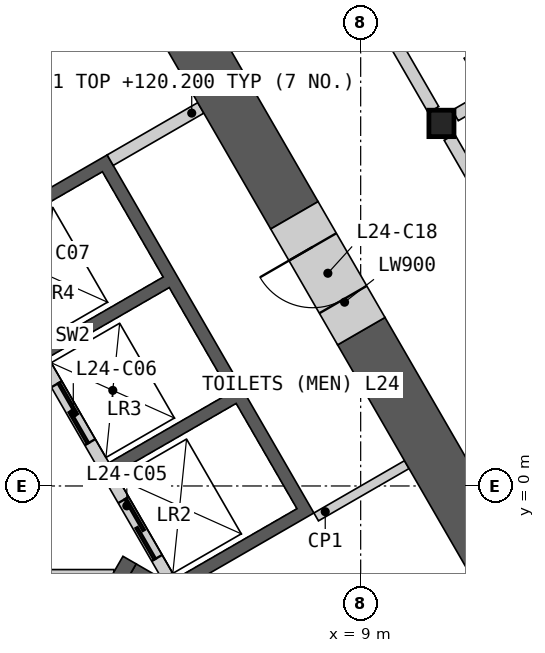
"""IFC4 building model, lengths in metres.
Left out: names, types, materials, properties, quantities, classifications, styles, units other than length and angle.
Written with IfcOpenShell. Run it as: python <this file> out.ifc"""

import sys

from ifc_helpers import new_model, si_unit, direction, frame, frame_2d, origin, origin_2d, place, context, subcontext, project, spatial, polyline, rectangle, i_section, outline, extrude, element, fill, save


model = new_model("IFC4")
c1 = context("Model", 3, precision=1e-05, world=origin(), true_north=direction((0.0, 1.0)))
c2 = subcontext(c1, "Body", "Model", "MODEL_VIEW")
j1 = project(units=[si_unit("LENGTHUNIT", "METRE"), si_unit("PLANEANGLEUNIT", "RADIAN")], contexts=[c1])
p1 = place(None, origin())
s1 = spatial("IfcSite", under=j1, at=p1, CompositionType="ELEMENT")
p2 = place(p1, origin())
s2 = spatial("IfcBuilding", under=s1, at=p2, CompositionType="ELEMENT")
p3 = place(p2, frame((0.0, 0.0, 116.4)))
s3 = spatial("IfcBuildingStorey", under=s2, at=p3, CompositionType="ELEMENT", Elevation=116.4)
p4 = place(p3, frame((10.328, 5.963, 0.0), z_axis=(0.0, 0.0, 1.0), x_axis=(1.0, 0.0, 0.0)))
e1 = element("IfcColumn", 1, at=p4, inside=s3, PredefinedType="COLUMN", context=c2, shape_type="SweptSolid", body=[
    extrude(i_section(OverallWidth=0.412, OverallDepth=0.435, WebThickness=0.036, FlangeThickness=0.057, at=origin_2d()), origin(), (0.0, 0.0, 1.0), 4.2),
])
p5 = place(p3, origin())
e2 = element("IfcWall", 2, at=p5, inside=s3, PredefinedType="SHEAR", context=c2, shape_type="SweptSolid", body=[
    extrude(outline(polyline([(2.66, 4.192), (4.831, 5.445), (8.231, -0.444), (6.061, -1.697), (5.96, -1.524), (7.952, -0.374), (6.952, 1.358), (4.96, 0.208), (4.861, 0.381), (6.852, 1.531), (5.852, 3.263), (3.861, 2.113), (3.76, 2.287), (5.752, 3.437), (4.752, 5.169), (2.76, 4.019), (2.66, 4.192)])), origin(), (0.0, 0.0, 1.0), 3.8),
])
p6 = place(p3, frame((5.817, -1.476, 0.0), z_axis=(0.0, 0.0, 1.0), x_axis=(-0.500002616675, 0.866023893041, 0.0)))
e3 = element("IfcWall", 3, at=p6, inside=s3, PredefinedType="SOLIDWALL", context=c2, shape_type="SweptSolid", body=[
    extrude(rectangle(XDim=8.373, YDim=0.2, at=frame_2d((4.187, 0.0))), origin(), (0.0, 0.0, 1.0), 3.8),
])
p7 = place(p6, frame((0.337, 0.0, 0.0)))
e4 = element("IfcOpeningElement", 4, at=p7, cuts=e3, PredefinedType="OPENING", context=c2, shape_type="SweptSolid", body=[
    extrude(rectangle(XDim=1.1, YDim=2.1, at=frame_2d((0.55, 1.05))), frame((0.0, 0.11, 0.0), z_axis=(0.0, -1.0, 0.0), x_axis=(1.0, 0.0, 0.0)), (0.0, 0.0, 1.0), 0.22),
])
p8 = place(p6, frame((2.537, 0.0, 0.0)))
e5 = element("IfcOpeningElement", 5, at=p8, cuts=e3, PredefinedType="OPENING", context=c2, shape_type="SweptSolid", body=[
    extrude(rectangle(XDim=1.1, YDim=2.1, at=frame_2d((0.55, 1.05))), frame((0.0, 0.11, 0.0), z_axis=(0.0, -1.0, 0.0), x_axis=(1.0, 0.0, 0.0)), (0.0, 0.0, 1.0), 0.22),
])
p9 = place(p6, frame((4.737, 0.0, 0.0)))
e6 = element("IfcOpeningElement", 6, at=p9, cuts=e3, PredefinedType="OPENING", context=c2, shape_type="SweptSolid", body=[
    extrude(rectangle(XDim=1.1, YDim=2.1, at=frame_2d((0.55, 1.05))), frame((0.0, 0.11, 0.0), z_axis=(0.0, -1.0, 0.0), x_axis=(1.0, 0.0, 0.0)), (0.0, 0.0, 1.0), 0.22),
])
p10 = place(p6, frame((7.037, 0.0, 0.0)))
e7 = element("IfcOpeningElement", 7, at=p10, cuts=e3, PredefinedType="OPENING", context=c2, shape_type="SweptSolid", body=[
    extrude(rectangle(XDim=0.9, YDim=2.1, at=frame_2d((0.45, 1.05))), frame((0.0, 0.11, 0.0), z_axis=(0.0, -1.0, 0.0), x_axis=(1.0, 0.0, 0.0)), (0.0, 0.0, 1.0), 0.22),
])
p11 = place(p3, frame((4.881, 5.358, 0.0), z_axis=(0.0, 0.0, 1.0), x_axis=(0.866024871741, 0.500000921525, 0.0)))
e8 = element("IfcWall", 8, at=p11, inside=s3, PredefinedType="SHEAR", context=c2, shape_type="SweptSolid", body=[
    extrude(rectangle(XDim=1.72, YDim=0.2, at=frame_2d((0.86, 0.0))), origin(), (0.0, 0.0, 1.0), 3.8),
])
p12 = place(p3, frame((-4.941, -1.45, 0.0), z_axis=(0.0, 0.0, 1.0), x_axis=(1.0, 0.0, 0.0)))
e9 = element("IfcWall", 9, at=p12, inside=s3, PredefinedType="PARTITIONING", context=c2, shape_type="SweptSolid", body=[
    extrude(rectangle(XDim=9.882, YDim=0.15, at=frame_2d((4.941, 0.0))), origin(), (0.0, 0.0, 1.0), 3.8),
])
p13 = place(p12, frame((4.391, 0.0, 0.0)))
e10 = element("IfcOpeningElement", 10, at=p13, cuts=e9, PredefinedType="OPENING", context=c2, shape_type="SweptSolid", body=[
    extrude(rectangle(XDim=1.1, YDim=2.1, at=frame_2d((0.55, 1.05))), frame((0.0, 0.085, 0.0), z_axis=(0.0, -1.0, 0.0), x_axis=(1.0, 0.0, 0.0)), (0.0, 0.0, 1.0), 0.17),
])
p14 = place(p3, origin())
e11 = element("IfcWall", 11, at=p14, inside=s3, PredefinedType="SHEAR", context=c2, shape_type="SweptSolid", body=[
    extrude(outline(polyline([(10.032, -4.298), (10.374, -4.206), (5.307, -1.281), (5.182, -1.498), (10.032, -4.298)])), origin(), (0.0, 0.0, 1.0), 3.8),
])
p15 = place(p3, frame((3.655, -3.893, 0.0), z_axis=(0.0, 0.0, 1.0), x_axis=(0.499982516597, 0.866035497597, 0.0)))
e12 = element("IfcWall", 12, at=p15, inside=s3, PredefinedType="SHEAR", context=c2, shape_type="SweptSolid", body=[
    extrude(rectangle(XDim=3.088, YDim=0.25, at=frame_2d((1.544, 0.0))), origin(), (0.0, 0.0, 1.0), 3.8),
])
p16 = place(p15, frame((0.994, 0.0, 0.0)))
e13 = element("IfcOpeningElement", 13, at=p16, cuts=e12, PredefinedType="OPENING", context=c2, shape_type="SweptSolid", body=[
    extrude(rectangle(XDim=1.1, YDim=2.1, at=frame_2d((0.55, 1.05))), frame((0.0, 0.135, 0.0), z_axis=(0.0, -1.0, 0.0), x_axis=(1.0, 0.0, 0.0)), (0.0, 0.0, 1.0), 0.27),
])
p17 = place(p3, frame((8.268, -0.509, 0.0), z_axis=(0.0, 0.0, 1.0), x_axis=(0.866024871741, 0.500000921525, 0.0)))
e14 = element("IfcWall", 14, at=p17, inside=s3, PredefinedType="PARTITIONING", context=c2, shape_type="SweptSolid", body=[
    extrude(rectangle(XDim=1.72, YDim=0.15, at=frame_2d((0.86, 0.0))), origin(), (0.0, 0.0, 1.0), 3.8),
])
p18 = place(p3, frame((7.91, 4.451, 0.0), z_axis=(0.0, 0.0, 1.0), x_axis=(-0.500005799286, 0.866022055539, 0.0)))
e15 = element("IfcWall", 15, at=p18, inside=s3, PredefinedType="SHEAR", context=c2, shape_type="SweptSolid", body=[
    extrude(rectangle(XDim=15.041, YDim=0.9, at=frame_2d((7.521, 0.0))), origin(), (0.0, 0.0, 1.0), 3.8),
])
p19 = place(p3, frame((15.331, -8.401, 0.0), z_axis=(0.0, 0.0, 1.0), x_axis=(-0.49999216708, 0.866029926076, 0.0)))
e16 = element("IfcWall", 16, at=p19, inside=s3, PredefinedType="SHEAR", context=c2, shape_type="SweptSolid", body=[
    extrude(rectangle(XDim=12.641, YDim=0.9, at=frame_2d((6.321, 0.0))), origin(), (0.0, 0.0, 1.0), 3.8),
])
p20 = place(p3, frame((9.01, 2.546, 0.0), z_axis=(0.0, 0.0, 1.0), x_axis=(-0.499994660107, 0.866028486751, 0.0)))
e17 = element("IfcWall", 17, at=p20, inside=s3, PredefinedType="SHEAR", context=c2, shape_type="SweptSolid", body=[
    extrude(rectangle(XDim=2.2, YDim=0.9, at=frame_2d((1.1, 0.0))), origin(), (0.0, 0.0, 1.0), 3.8),
])
p21 = place(p20, frame((0.6, 0.0, 0.0)))
e18 = element("IfcOpeningElement", 18, at=p21, cuts=e17, PredefinedType="OPENING", context=c2, shape_type="SweptSolid", body=[
    extrude(rectangle(XDim=1.0, YDim=2.1, at=frame_2d((0.5, 1.05))), frame((0.0, 0.46, 0.0), z_axis=(0.0, -1.0, 0.0), x_axis=(1.0, 0.0, 0.0)), (0.0, 0.0, 1.0), 0.92),
])
p22 = place(p3, frame((10.46, 5.736, 0.0), z_axis=(0.0, 0.0, 1.0), x_axis=(0.500004141693, -0.866023012564, 0.0)))
e19 = element("IfcWall", 19, at=p22, inside=s3, PredefinedType="PARTITIONING", context=c2, shape_type="SweptSolid", body=[
    extrude(rectangle(XDim=9.803, YDim=0.2, at=frame_2d((4.902, 0.0))), origin(), (0.0, 0.0, 1.0), 3.8),
])
p23 = place(p22, frame((4.352, 0.0, 0.0)))
e20 = element("IfcOpeningElement", 20, at=p23, cuts=e19, PredefinedType="OPENING", context=c2, shape_type="SweptSolid", body=[
    extrude(rectangle(XDim=1.0, YDim=2.1, at=frame_2d((0.5, 1.05))), frame((0.0, 0.11, 0.0), z_axis=(0.0, -1.0, 0.0), x_axis=(1.0, 0.0, 0.0)), (0.0, 0.0, 1.0), 0.22),
])
p24 = place(p3, frame((5.295, 14.68, 0.0), z_axis=(0.0, 0.0, 1.0), x_axis=(0.500012035596, -0.866018454918, 0.0)))
e21 = element("IfcWall", 21, at=p24, inside=s3, PredefinedType="PARTITIONING", context=c2, shape_type="SweptSolid", body=[
    extrude(rectangle(XDim=9.803, YDim=0.2, at=frame_2d((4.902, 0.0))), origin(), (0.0, 0.0, 1.0), 3.8),
])
p25 = place(p24, frame((4.376, 0.0, 0.0)))
e22 = element("IfcOpeningElement", 22, at=p25, cuts=e21, PredefinedType="OPENING", context=c2, shape_type="SweptSolid", body=[
    extrude(rectangle(XDim=0.95, YDim=2.1, at=frame_2d((0.475, 1.05))), frame((0.0, 0.11, 0.0), z_axis=(0.0, -1.0, 0.0), x_axis=(1.0, 0.0, 0.0)), (0.0, 0.0, 1.0), 0.22),
])
p26 = place(p3, frame((10.556, 6.094, 0.0), z_axis=(0.0, 0.0, 1.0), x_axis=(0.86602461759, 0.500001361726, 0.0)))
e23 = element("IfcWall", 23, at=p26, inside=s3, PredefinedType="PARTITIONING", context=c2, shape_type="SweptSolid", body=[
    extrude(rectangle(XDim=12.679, YDim=0.2, at=frame_2d((6.34, 0.0))), origin(), (0.0, 0.0, 1.0), 2.885),
])
p27 = place(p7, origin())
e24 = element("IfcDoor", 24, at=p27, inside=s3, OperationType="SLIDING_TO_LEFT", PredefinedType="DOOR", context=c2, shape_type="SweptSolid", body=[
    extrude(rectangle(XDim=1.1, YDim=2.1, at=frame_2d((0.55, 1.05))), frame((0.0, 0.025, 0.0), z_axis=(0.0, -1.0, 0.0), x_axis=(1.0, 0.0, 0.0)), (0.0, 0.0, 1.0), 0.05),
])
fill(e4, e24)
p28 = place(p8, origin())
e25 = element("IfcDoor", 25, at=p28, inside=s3, OperationType="SLIDING_TO_LEFT", PredefinedType="DOOR", context=c2, shape_type="SweptSolid", body=[
    extrude(rectangle(XDim=1.1, YDim=2.1, at=frame_2d((0.55, 1.05))), frame((0.0, 0.025, 0.0), z_axis=(0.0, -1.0, 0.0), x_axis=(1.0, 0.0, 0.0)), (0.0, 0.0, 1.0), 0.05),
])
fill(e5, e25)
p29 = place(p21, origin())
e26 = element("IfcDoor", 26, at=p29, inside=s3, OperationType="SINGLE_SWING_RIGHT", PredefinedType="DOOR", context=c2, shape_type="SweptSolid", body=[
    extrude(rectangle(XDim=1.0, YDim=2.1, at=frame_2d((0.5, 1.05))), frame((0.0, 0.205, 0.0), z_axis=(0.0, -1.0, 0.0), x_axis=(1.0, 0.0, 0.0)), (0.0, 0.0, 1.0), 0.05),
])
fill(e18, e26)
save(model, sys.argv[1])
